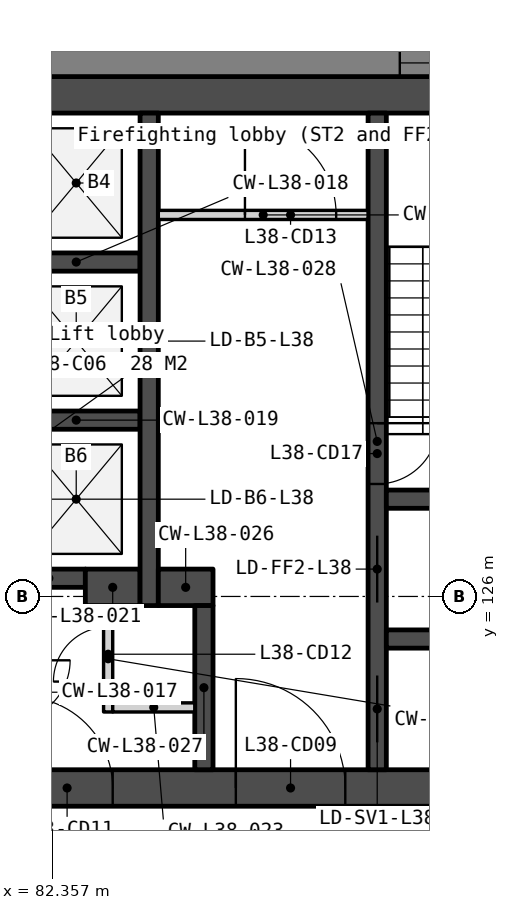
"""IFC4 building model, lengths in metres.
Left out: names, types, materials, properties, quantities, classifications, styles, units other than length and angle.
Written with IfcOpenShell. Run it as: python <this file> out.ifc"""

import sys

from ifc_helpers import new_model, si_unit, direction, frame, frame_2d, origin, place, context, subcontext, project, spatial, polyline, rectangle, outline, extrude, element, fill, save


model = new_model("IFC4")
c1 = context("Model", 3, precision=1e-05, world=origin(), true_north=direction((0.0, 1.0)))
c2 = subcontext(c1, "Body", "Model", "MODEL_VIEW")
j1 = project(units=[si_unit("LENGTHUNIT", "METRE"), si_unit("PLANEANGLEUNIT", "RADIAN")], contexts=[c1])
p1 = place(None, origin())
s1 = spatial("IfcSite", under=j1, at=p1, CompositionType="ELEMENT")
p2 = place(p1, origin())
s2 = spatial("IfcBuilding", under=s1, at=p2, CompositionType="ELEMENT")
p3 = place(p2, frame((0.0, 0.0, 152.0)))
s3 = spatial("IfcBuildingStorey", under=s2, at=p3, CompositionType="ELEMENT", Elevation=152.0)
p4 = place(p3, frame((69.0, 134.25, 0.0), z_axis=(0.0, 0.0, 1.0), x_axis=(1.0, 0.0, 0.0)))
e1 = element("IfcWall", 1, at=p4, inside=s3, PredefinedType="SOLIDWALL", context=c2, shape_type="SweptSolid", body=[
    extrude(rectangle(XDim=22.0, YDim=0.6, at=frame_2d((11.0, 0.0))), origin(), (0.0, 0.0, 1.0), 3.75),
])
p5 = place(p3, frame((69.0, 122.85, 0.0), z_axis=(0.0, 0.0, 1.0), x_axis=(1.0, 0.0, 0.0)))
e2 = element("IfcWall", 2, at=p5, inside=s3, PredefinedType="SOLIDWALL", context=c2, shape_type="SweptSolid", body=[
    extrude(rectangle(XDim=22.0, YDim=0.6, at=frame_2d((11.0, 0.0))), origin(), (0.0, 0.0, 1.0), 3.75),
])
p6 = place(p5, frame((16.375, 0.0, 0.0)))
e3 = element("IfcOpeningElement", 3, at=p6, cuts=e2, PredefinedType="OPENING", context=c2, shape_type="SweptSolid", body=[
    extrude(rectangle(XDim=1.8, YDim=2.1, at=frame_2d((0.9, 1.05))), frame((0.0, 0.31, 0.0), z_axis=(0.0, -1.0, 0.0), x_axis=(1.0, 0.0, 0.0)), (0.0, 0.0, 1.0), 0.62),
])
p7 = place(p5, frame((3.825, 0.0, 0.0)))
e4 = element("IfcOpeningElement", 4, at=p7, cuts=e2, PredefinedType="OPENING", context=c2, shape_type="SweptSolid", body=[
    extrude(rectangle(XDim=1.8, YDim=2.1, at=frame_2d((0.9, 1.05))), frame((0.0, 0.31, 0.0), z_axis=(0.0, -1.0, 0.0), x_axis=(1.0, 0.0, 0.0)), (0.0, 0.0, 1.0), 0.62),
])
p8 = place(p5, frame((12.85, 0.0, 0.0)))
e5 = element("IfcOpeningElement", 5, at=p8, cuts=e2, PredefinedType="OPENING", context=c2, shape_type="SweptSolid", body=[
    extrude(rectangle(XDim=1.5, YDim=2.1, at=frame_2d((0.75, 1.05))), frame((0.0, 0.31, 0.0), z_axis=(0.0, -1.0, 0.0), x_axis=(1.0, 0.0, 0.0)), (0.0, 0.0, 1.0), 0.62),
])
for number, where, z_axis, x_axis in (
    (6, (81.7, 131.5, 0.0), (0.0, 0.0, 1.0), (1.0, 0.0, 0.0)),
    (7, (81.7, 128.9, 0.0), (0.0, 0.0, 1.0), (1.0, 0.0, 0.0)),
):
    element("IfcWall", number, at=place(p3, frame(where, z_axis=z_axis, x_axis=x_axis)), inside=s3, PredefinedType="SOLIDWALL", context=c2, shape_type="SweptSolid", body=[
        extrude(rectangle(XDim=2.1, YDim=0.3, at=frame_2d((1.05, 0.0))), origin(), (0.0, 0.0, 1.0), 3.75),
    ])
p9 = place(p3, frame((81.7, 126.3, 0.0), z_axis=(0.0, 0.0, 1.0), x_axis=(1.0, 0.0, 0.0)))
e8 = element("IfcWall", 8, at=p9, inside=s3, PredefinedType="SOLIDWALL", context=c2, shape_type="SweptSolid", body=[
    extrude(rectangle(XDim=1.2, YDim=0.3, at=frame_2d((0.6, 0.0))), origin(), (0.0, 0.0, 1.0), 3.75),
])
p10 = place(p3, frame((82.9, 126.15, 0.0), z_axis=(0.0, 0.0, 1.0), x_axis=(1.0, 0.0, 0.0)))
e9 = element("IfcWall", 9, at=p10, inside=s3, PredefinedType="SOLIDWALL", context=c2, shape_type="SweptSolid", body=[
    extrude(rectangle(XDim=0.9, YDim=0.6, at=frame_2d((0.45, 0.0))), origin(), (0.0, 0.0, 1.0), 3.75),
])
p11 = place(p3, frame((83.275, 125.85, 0.0), z_axis=(0.0, 0.0, 1.0), x_axis=(0.0, -1.0, 0.0)))
e10 = element("IfcWall", 10, at=p11, inside=s3, PredefinedType="PARTITIONING", context=c2, shape_type="SweptSolid", body=[
    extrude(rectangle(XDim=1.75, YDim=0.15, at=frame_2d((0.875, 0.0))), origin(), (0.0, 0.0, 1.0), 3.75),
])
p12 = place(p11, frame((0.35, 0.0, 0.0)))
e11 = element("IfcOpeningElement", 11, at=p12, cuts=e10, PredefinedType="OPENING", context=c2, shape_type="SweptSolid", body=[
    extrude(rectangle(XDim=0.9, YDim=2.1, at=frame_2d((0.45, 1.05))), frame((0.0, 0.085, 0.0), z_axis=(0.0, -1.0, 0.0), x_axis=(1.0, 0.0, 0.0)), (0.0, 0.0, 1.0), 0.17),
])
p13 = place(p3, frame((83.35, 124.175, 0.0), z_axis=(0.0, 0.0, 1.0), x_axis=(1.0, 0.0, 0.0)))
e12 = element("IfcWall", 12, at=p13, inside=s3, PredefinedType="PARTITIONING", context=c2, shape_type="SweptSolid", body=[
    extrude(rectangle(XDim=1.35, YDim=0.15, at=frame_2d((0.675, 0.0))), origin(), (0.0, 0.0, 1.0), 3.75),
])
p14 = place(p3, frame((83.95, 133.95, 0.0), z_axis=(0.0, 0.0, 1.0), x_axis=(0.0, -1.0, 0.0)))
e13 = element("IfcWall", 13, at=p14, inside=s3, PredefinedType="SOLIDWALL", context=c2, shape_type="SweptSolid", body=[
    extrude(rectangle(XDim=8.1, YDim=0.3, at=frame_2d((4.05, 0.0))), origin(), (0.0, 0.0, 1.0), 3.75),
])
p15 = place(p3, frame((84.1, 132.275, 0.0), z_axis=(0.0, 0.0, 1.0), x_axis=(1.0, 0.0, 0.0)))
e14 = element("IfcWall", 14, at=p15, inside=s3, PredefinedType="PARTITIONING", context=c2, shape_type="SweptSolid", body=[
    extrude(rectangle(XDim=3.45, YDim=0.15, at=frame_2d((1.725, 0.0))), origin(), (0.0, 0.0, 1.0), 3.75),
])
p16 = place(p15, frame((1.425, 0.0, 0.0)))
e15 = element("IfcOpeningElement", 15, at=p16, cuts=e14, PredefinedType="OPENING", context=c2, shape_type="SweptSolid", body=[
    extrude(rectangle(XDim=1.5, YDim=2.1, at=frame_2d((0.75, 1.05))), frame((0.0, 0.085, 0.0), z_axis=(0.0, -1.0, 0.0), x_axis=(1.0, 0.0, 0.0)), (0.0, 0.0, 1.0), 0.17),
])
p17 = place(p3, frame((84.1, 126.15, 0.0), z_axis=(0.0, 0.0, 1.0), x_axis=(1.0, 0.0, 0.0)))
e16 = element("IfcWall", 16, at=p17, inside=s3, PredefinedType="SOLIDWALL", context=c2, shape_type="SweptSolid", body=[
    extrude(rectangle(XDim=0.9, YDim=0.6, at=frame_2d((0.45, 0.0))), origin(), (0.0, 0.0, 1.0), 3.75),
])
p18 = place(p3, frame((84.85, 125.85, 0.0), z_axis=(0.0, 0.0, 1.0), x_axis=(0.0, -1.0, 0.0)))
e17 = element("IfcWall", 17, at=p18, inside=s3, PredefinedType="SOLIDWALL", context=c2, shape_type="SweptSolid", body=[
    extrude(rectangle(XDim=2.7, YDim=0.3, at=frame_2d((1.35, 0.0))), origin(), (0.0, 0.0, 1.0), 3.75),
])
p19 = place(p3, frame((87.7, 133.95, 0.0), z_axis=(0.0, 0.0, 1.0), x_axis=(0.0, -1.0, 0.0)))
e18 = element("IfcWall", 18, at=p19, inside=s3, PredefinedType="SOLIDWALL", context=c2, shape_type="SweptSolid", body=[
    extrude(rectangle(XDim=10.8, YDim=0.3, at=frame_2d((5.4, 0.0))), origin(), (0.0, 0.0, 1.0), 3.75),
])
p20 = place(p19, frame((6.95, 0.0, 0.0)))
e19 = element("IfcOpeningElement", 19, at=p20, cuts=e18, PredefinedType="OPENING", context=c2, shape_type="SweptSolid", body=[
    extrude(rectangle(XDim=1.1, YDim=2.1, at=frame_2d((0.55, 1.05))), frame((0.0, 0.16, 0.0), z_axis=(0.0, -1.0, 0.0), x_axis=(1.0, 0.0, 0.0)), (0.0, 0.0, 1.0), 0.32),
])
p21 = place(p19, frame((5.1, 0.0, 0.0)))
e20 = element("IfcOpeningElement", 20, at=p21, cuts=e18, PredefinedType="OPENING", context=c2, shape_type="SweptSolid", body=[
    extrude(rectangle(XDim=1.0, YDim=2.1, at=frame_2d((0.5, 1.05))), frame((0.0, 0.16, 0.0), z_axis=(0.0, -1.0, 0.0), x_axis=(1.0, 0.0, 0.0)), (0.0, 0.0, 1.0), 0.32),
])
p22 = place(p19, frame((9.25, 0.0, 0.0)))
e21 = element("IfcOpeningElement", 21, at=p22, cuts=e18, PredefinedType="OPENING", context=c2, shape_type="SweptSolid", body=[
    extrude(rectangle(XDim=1.1, YDim=2.1, at=frame_2d((0.55, 1.05))), frame((0.0, 0.16, 0.0), z_axis=(0.0, -1.0, 0.0), x_axis=(1.0, 0.0, 0.0)), (0.0, 0.0, 1.0), 0.32),
])
for number, where, z_axis, x_axis in (
    (22, (87.85, 127.6, 0.0), (0.0, 0.0, 1.0), (1.0, 0.0, 0.0)),
    (23, (87.85, 125.3, 0.0), (0.0, 0.0, 1.0), (1.0, 0.0, 0.0)),
):
    element("IfcWall", number, at=place(p3, frame(where, z_axis=z_axis, x_axis=x_axis)), inside=s3, PredefinedType="SOLIDWALL", context=c2, shape_type="SweptSolid", body=[
        extrude(rectangle(XDim=2.55, YDim=0.3, at=frame_2d((1.275, 0.0))), origin(), (0.0, 0.0, 1.0), 3.75),
    ])
p23 = place(p3, frame((100.243, 134.775, -0.15), z_axis=(0.0, 0.0, 1.0), x_axis=(-1.0, 0.0, 0.0)))
e24 = element("IfcWall", 24, at=p23, inside=s3, PredefinedType="SOLIDWALL", context=c2, shape_type="SweptSolid", body=[
    extrude(outline(polyline([(40.486, 0.0), (40.486, 3.9), (0.0, 3.9), (0.0, 0.0), (40.486, 0.0)])), frame((0.0, 0.225, 0.0), z_axis=(0.0, -1.0, 0.0), x_axis=(1.0, 0.0, 0.0)), (0.0, 0.0, 1.0), 0.45),
])
p24 = place(p23, frame((0.87, 0.0, 0.95)))
e25 = element("IfcOpeningElement", 25, at=p24, cuts=e24, PredefinedType="OPENING", context=c2, shape_type="SweptSolid", body=[
    extrude(rectangle(XDim=1.2, YDim=2.2, at=frame_2d((0.6, 1.1))), frame((0.0, 0.235, 0.0), z_axis=(0.0, -1.0, 0.0), x_axis=(1.0, 0.0, 0.0)), (0.0, 0.0, 1.0), 0.47),
])
p25 = place(p23, frame((8.072, 0.0, 0.95)))
e26 = element("IfcOpeningElement", 26, at=p25, cuts=e24, PredefinedType="OPENING", context=c2, shape_type="SweptSolid", body=[
    extrude(rectangle(XDim=1.8, YDim=2.2, at=frame_2d((0.9, 1.1))), frame((0.0, 0.235, 0.0), z_axis=(0.0, -1.0, 0.0), x_axis=(1.0, 0.0, 0.0)), (0.0, 0.0, 1.0), 0.47),
])
p26 = place(p23, frame((10.372, 0.0, 0.95)))
e27 = element("IfcOpeningElement", 27, at=p26, cuts=e24, PredefinedType="OPENING", context=c2, shape_type="SweptSolid", body=[
    extrude(rectangle(XDim=1.8, YDim=2.2, at=frame_2d((0.9, 1.1))), frame((0.0, 0.235, 0.0), z_axis=(0.0, -1.0, 0.0), x_axis=(1.0, 0.0, 0.0)), (0.0, 0.0, 1.0), 0.47),
])
p27 = place(p23, frame((18.193, 0.0, 0.95)))
e28 = element("IfcOpeningElement", 28, at=p27, cuts=e24, PredefinedType="OPENING", context=c2, shape_type="SweptSolid", body=[
    extrude(rectangle(XDim=1.8, YDim=2.2, at=frame_2d((0.9, 1.1))), frame((0.0, 0.235, 0.0), z_axis=(0.0, -1.0, 0.0), x_axis=(1.0, 0.0, 0.0)), (0.0, 0.0, 1.0), 0.47),
])
p28 = place(p23, frame((20.493, 0.0, 0.95)))
e29 = element("IfcOpeningElement", 29, at=p28, cuts=e24, PredefinedType="OPENING", context=c2, shape_type="SweptSolid", body=[
    extrude(rectangle(XDim=1.8, YDim=2.2, at=frame_2d((0.9, 1.1))), frame((0.0, 0.235, 0.0), z_axis=(0.0, -1.0, 0.0), x_axis=(1.0, 0.0, 0.0)), (0.0, 0.0, 1.0), 0.47),
])
p29 = place(p23, frame((28.315, 0.0, 0.95)))
e30 = element("IfcOpeningElement", 30, at=p29, cuts=e24, PredefinedType="OPENING", context=c2, shape_type="SweptSolid", body=[
    extrude(rectangle(XDim=1.8, YDim=2.2, at=frame_2d((0.9, 1.1))), frame((0.0, 0.235, 0.0), z_axis=(0.0, -1.0, 0.0), x_axis=(1.0, 0.0, 0.0)), (0.0, 0.0, 1.0), 0.47),
])
p30 = place(p23, frame((30.615, 0.0, 0.95)))
e31 = element("IfcOpeningElement", 31, at=p30, cuts=e24, PredefinedType="OPENING", context=c2, shape_type="SweptSolid", body=[
    extrude(rectangle(XDim=1.8, YDim=2.2, at=frame_2d((0.9, 1.1))), frame((0.0, 0.235, 0.0), z_axis=(0.0, -1.0, 0.0), x_axis=(1.0, 0.0, 0.0)), (0.0, 0.0, 1.0), 0.47),
])
p31 = place(p23, frame((38.417, 0.0, 0.95)))
e32 = element("IfcOpeningElement", 32, at=p31, cuts=e24, PredefinedType="OPENING", context=c2, shape_type="SweptSolid", body=[
    extrude(rectangle(XDim=1.2, YDim=2.2, at=frame_2d((0.6, 1.1))), frame((0.0, 0.235, 0.0), z_axis=(0.0, -1.0, 0.0), x_axis=(1.0, 0.0, 0.0)), (0.0, 0.0, 1.0), 0.47),
])
p32 = place(p3, frame((82.105, 96.067, -0.15), z_axis=(0.0, 0.0, 1.0), x_axis=(0.499997369791, 0.866026922331, 0.0)))
e33 = element("IfcWall", 33, at=p32, inside=s3, PredefinedType="SOLIDWALL", context=c2, shape_type="SweptSolid", body=[
    extrude(outline(polyline([(40.486, 0.0), (40.486, 3.9), (0.0, 3.9), (0.0, 0.0), (40.486, 0.0)])), frame((0.0, 0.225, 0.0), z_axis=(0.0, -1.0, 0.0), x_axis=(1.0, 0.0, 0.0)), (0.0, 0.0, 1.0), 0.45),
])
p33 = place(p32, frame((0.87, 0.0, 0.95)))
e34 = element("IfcOpeningElement", 34, at=p33, cuts=e33, PredefinedType="OPENING", context=c2, shape_type="SweptSolid", body=[
    extrude(rectangle(XDim=1.2, YDim=2.2, at=frame_2d((0.6, 1.1))), frame((0.0, 0.235, 0.0), z_axis=(0.0, -1.0, 0.0), x_axis=(1.0, 0.0, 0.0)), (0.0, 0.0, 1.0), 0.47),
])
p34 = place(p32, frame((8.072, 0.0, 0.95)))
e35 = element("IfcOpeningElement", 35, at=p34, cuts=e33, PredefinedType="OPENING", context=c2, shape_type="SweptSolid", body=[
    extrude(rectangle(XDim=1.8, YDim=2.2, at=frame_2d((0.9, 1.1))), frame((0.0, 0.235, 0.0), z_axis=(0.0, -1.0, 0.0), x_axis=(1.0, 0.0, 0.0)), (0.0, 0.0, 1.0), 0.47),
])
p35 = place(p32, frame((10.372, 0.0, 0.95)))
e36 = element("IfcOpeningElement", 36, at=p35, cuts=e33, PredefinedType="OPENING", context=c2, shape_type="SweptSolid", body=[
    extrude(rectangle(XDim=1.8, YDim=2.2, at=frame_2d((0.9, 1.1))), frame((0.0, 0.235, 0.0), z_axis=(0.0, -1.0, 0.0), x_axis=(1.0, 0.0, 0.0)), (0.0, 0.0, 1.0), 0.47),
])
p36 = place(p32, frame((18.193, 0.0, 0.95)))
e37 = element("IfcOpeningElement", 37, at=p36, cuts=e33, PredefinedType="OPENING", context=c2, shape_type="SweptSolid", body=[
    extrude(rectangle(XDim=1.8, YDim=2.2, at=frame_2d((0.9, 1.1))), frame((0.0, 0.235, 0.0), z_axis=(0.0, -1.0, 0.0), x_axis=(1.0, 0.0, 0.0)), (0.0, 0.0, 1.0), 0.47),
])
p37 = place(p32, frame((20.493, 0.0, 0.95)))
e38 = element("IfcOpeningElement", 38, at=p37, cuts=e33, PredefinedType="OPENING", context=c2, shape_type="SweptSolid", body=[
    extrude(rectangle(XDim=1.8, YDim=2.2, at=frame_2d((0.9, 1.1))), frame((0.0, 0.235, 0.0), z_axis=(0.0, -1.0, 0.0), x_axis=(1.0, 0.0, 0.0)), (0.0, 0.0, 1.0), 0.47),
])
p38 = place(p32, frame((28.315, 0.0, 0.95)))
e39 = element("IfcOpeningElement", 39, at=p38, cuts=e33, PredefinedType="OPENING", context=c2, shape_type="SweptSolid", body=[
    extrude(rectangle(XDim=1.8, YDim=2.2, at=frame_2d((0.9, 1.1))), frame((0.0, 0.235, 0.0), z_axis=(0.0, -1.0, 0.0), x_axis=(1.0, 0.0, 0.0)), (0.0, 0.0, 1.0), 0.47),
])
p39 = place(p32, frame((30.615, 0.0, 0.95)))
e40 = element("IfcOpeningElement", 40, at=p39, cuts=e33, PredefinedType="OPENING", context=c2, shape_type="SweptSolid", body=[
    extrude(rectangle(XDim=1.8, YDim=2.2, at=frame_2d((0.9, 1.1))), frame((0.0, 0.235, 0.0), z_axis=(0.0, -1.0, 0.0), x_axis=(1.0, 0.0, 0.0)), (0.0, 0.0, 1.0), 0.47),
])
p40 = place(p32, frame((38.417, 0.0, 0.95)))
e41 = element("IfcOpeningElement", 41, at=p40, cuts=e33, PredefinedType="OPENING", context=c2, shape_type="SweptSolid", body=[
    extrude(rectangle(XDim=1.2, YDim=2.2, at=frame_2d((0.6, 1.1))), frame((0.0, 0.235, 0.0), z_axis=(0.0, -1.0, 0.0), x_axis=(1.0, 0.0, 0.0)), (0.0, 0.0, 1.0), 0.47),
])
p41 = place(p20, origin())
e42 = element("IfcDoor", 42, at=p41, inside=s3, OperationType="SLIDING_TO_LEFT", PredefinedType="DOOR", context=c2, shape_type="SweptSolid", body=[
    extrude(rectangle(XDim=1.1, YDim=2.1, at=frame_2d((0.55, 1.05))), frame((0.0, 0.025, 0.0), z_axis=(0.0, -1.0, 0.0), x_axis=(1.0, 0.0, 0.0)), (0.0, 0.0, 1.0), 0.05),
])
fill(e19, e42)
p42 = place(p6, origin())
e43 = element("IfcDoor", 43, at=p42, inside=s3, OperationType="DOUBLE_DOOR_DOUBLE_SWING", PredefinedType="DOOR", context=c2, shape_type="SweptSolid", body=[
    extrude(rectangle(XDim=1.8, YDim=2.1, at=frame_2d((0.9, 1.05))), frame((0.0, 0.025, 0.0), z_axis=(0.0, -1.0, 0.0), x_axis=(1.0, 0.0, 0.0)), (0.0, 0.0, 1.0), 0.05),
])
fill(e3, e43)
p43 = place(p8, origin())
e44 = element("IfcDoor", 44, at=p43, inside=s3, OperationType="DOUBLE_DOOR_DOUBLE_SWING", PredefinedType="DOOR", context=c2, shape_type="SweptSolid", body=[
    extrude(rectangle(XDim=1.5, YDim=2.1, at=frame_2d((0.75, 1.05))), frame((0.0, 0.025, 0.0), z_axis=(0.0, -1.0, 0.0), x_axis=(1.0, 0.0, 0.0)), (0.0, 0.0, 1.0), 0.05),
])
fill(e5, e44)
p44 = place(p12, origin())
e45 = element("IfcDoor", 45, at=p44, inside=s3, OperationType="SINGLE_SWING_RIGHT", PredefinedType="DOOR", context=c2, shape_type="SweptSolid", body=[
    extrude(rectangle(XDim=0.9, YDim=2.1, at=frame_2d((0.45, 1.05))), frame((0.0, 0.025, 0.0), z_axis=(0.0, -1.0, 0.0), x_axis=(1.0, 0.0, 0.0)), (0.0, 0.0, 1.0), 0.05),
])
fill(e11, e45)
p45 = place(p16, origin())
e46 = element("IfcDoor", 46, at=p45, inside=s3, OperationType="DOUBLE_DOOR_DOUBLE_SWING", PredefinedType="DOOR", context=c2, shape_type="SweptSolid", body=[
    extrude(rectangle(XDim=1.5, YDim=2.1, at=frame_2d((0.75, 1.05))), frame((0.0, 0.025, 0.0), z_axis=(0.0, -1.0, 0.0), x_axis=(1.0, 0.0, 0.0)), (0.0, 0.0, 1.0), 0.05),
])
fill(e15, e46)
p46 = place(p21, origin())
e47 = element("IfcDoor", 47, at=p46, inside=s3, OperationType="SINGLE_SWING_LEFT", PredefinedType="DOOR", context=c2, shape_type="SweptSolid", body=[
    extrude(rectangle(XDim=1.0, YDim=2.1, at=frame_2d((0.5, 1.05))), frame((0.0, 0.025, 0.0), z_axis=(0.0, -1.0, 0.0), x_axis=(1.0, 0.0, 0.0)), (0.0, 0.0, 1.0), 0.05),
])
fill(e20, e47)
p47 = place(p22, origin())
e48 = element("IfcDoor", 48, at=p47, inside=s3, OperationType="SLIDING_TO_LEFT", PredefinedType="DOOR", context=c2, shape_type="SweptSolid", body=[
    extrude(rectangle(XDim=1.1, YDim=2.1, at=frame_2d((0.55, 1.05))), frame((0.0, 0.025, 0.0), z_axis=(0.0, -1.0, 0.0), x_axis=(1.0, 0.0, 0.0)), (0.0, 0.0, 1.0), 0.05),
])
fill(e21, e48)
p48 = place(p26, origin())
e49 = element("IfcWindow", 49, at=p48, inside=s3, PartitioningType="SINGLE_PANEL", PredefinedType="WINDOW", context=c2, shape_type="SweptSolid", body=[
    extrude(rectangle(XDim=1.8, YDim=2.2, at=frame_2d((0.9, 1.1))), frame((0.0, 0.03, 0.0), z_axis=(0.0, -1.0, 0.0), x_axis=(1.0, 0.0, 0.0)), (0.0, 0.0, 1.0), 0.06),
])
fill(e27, e49)
save(model, sys.argv[1])
